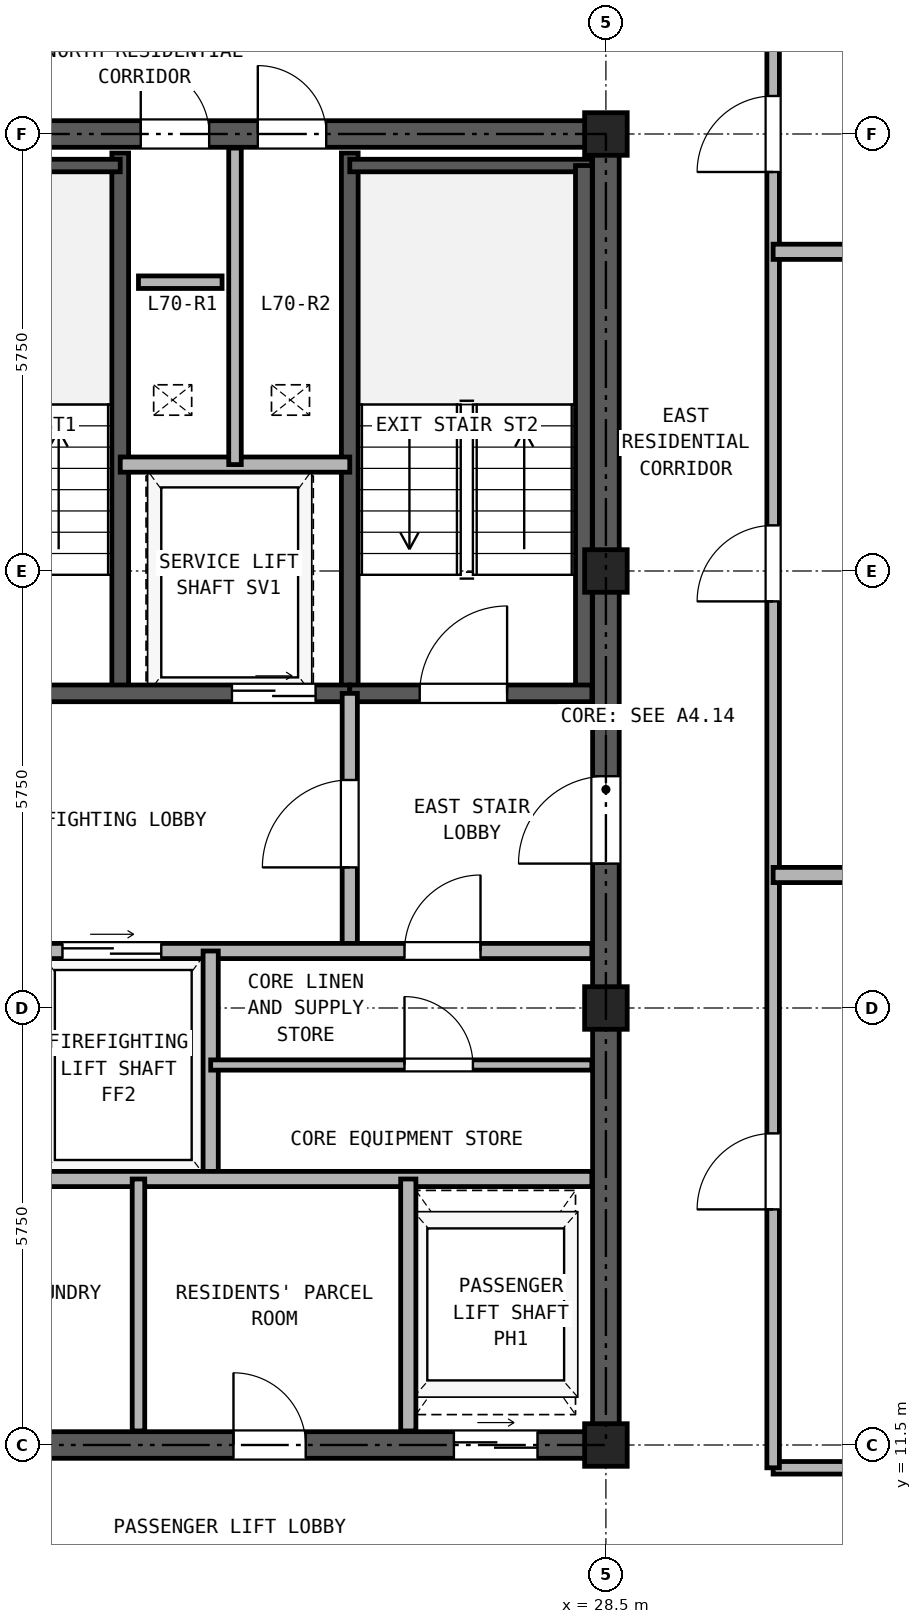
"""IFC4 building model, lengths in metres.
Left out: names, types, materials, properties, quantities, classifications, styles, units other than length and angle.
Written with IfcOpenShell. Run it as: python <this file> out.ifc"""

import sys

from ifc_helpers import new_model, si_unit, direction, frame, frame_2d, origin, origin_2d, place, context, subcontext, project, spatial, rectangle, hollow_rectangle, extrude, source, transform, mapped, element, fill, save


model = new_model("IFC4")
c1 = context("Model", 3, precision=1e-05, world=origin(), true_north=direction((0.0, 1.0)))
c2 = subcontext(c1, "Body", "Model", "MODEL_VIEW")
j1 = project(units=[si_unit("LENGTHUNIT", "METRE"), si_unit("PLANEANGLEUNIT", "RADIAN")], contexts=[c1])
p1 = place(None, origin())
s1 = spatial("IfcSite", under=j1, at=p1, CompositionType="ELEMENT")
p2 = place(p1, origin())
s2 = spatial("IfcBuilding", under=s1, at=p2, CompositionType="ELEMENT")
p3 = place(p2, frame((0.0, 0.0, 245.7)))
s3 = spatial("IfcBuildingStorey", under=s2, at=p3, CompositionType="ELEMENT", Elevation=245.7)
m1 = source(origin(), c2, "Body", "SweptSolid", [
    extrude(hollow_rectangle(XDim=0.56, YDim=0.56, WallThickness=0.03, at=origin_2d()), origin(), (0.0, 0.0, 1.0), 2.98),
])
for number, where, z_axis, x_axis in (
    (1, (28.5, 11.5, 0.0), (0.0, 0.0, 1.0), (1.0, 0.0, 0.0)),
    (2, (28.5, 17.25, 0.0), (0.0, 0.0, 1.0), (1.0, 0.0, 0.0)),
    (3, (28.5, 23.0, 0.0), (0.0, 0.0, 1.0), (1.0, 0.0, 0.0)),
    (4, (28.5, 28.75, 0.0), (0.0, 0.0, 1.0), (1.0, 0.0, 0.0)),
):
    element("IfcColumn", number, at=place(p3, frame(where, z_axis=z_axis, x_axis=x_axis)), inside=s3, PredefinedType="COLUMN", context=c2, shape_type="MappedRepresentation", body=[
        mapped(m1, transform((0.0, 0.0, 0.0), x_axis=(1.0, 0.0, 0.0), y_axis=(0.0, 1.0, 0.0), z_axis=(0.0, 0.0, 1.0), scale=1.0)),
    ])
p4 = place(p3, frame((18.325, 11.5, 0.0), z_axis=(0.0, 0.0, 1.0), x_axis=(1.0, 0.0, 0.0)))
e5 = element("IfcWall", 5, at=p4, inside=s3, PredefinedType="SHEAR", context=c2, shape_type="SweptSolid", body=[
    extrude(rectangle(XDim=10.35, YDim=0.35, at=frame_2d((5.175, 0.0))), origin(), (0.0, 0.0, 1.0), 2.98),
])
p5 = place(p4, frame((1.775, 0.0, 0.0)))
e6 = element("IfcOpeningElement", 6, at=p5, cuts=e5, PredefinedType="OPENING", context=c2, shape_type="SweptSolid", body=[
    extrude(rectangle(XDim=0.95, YDim=2.15, at=frame_2d((0.475, 1.075))), frame((0.0, 0.185, 0.0), z_axis=(0.0, -1.0, 0.0), x_axis=(1.0, 0.0, 0.0)), (0.0, 0.0, 1.0), 0.37),
])
p6 = place(p4, frame((5.275, 0.0, 0.0)))
e7 = element("IfcOpeningElement", 7, at=p6, cuts=e5, PredefinedType="OPENING", context=c2, shape_type="SweptSolid", body=[
    extrude(rectangle(XDim=0.95, YDim=2.15, at=frame_2d((0.475, 1.075))), frame((0.0, 0.185, 0.0), z_axis=(0.0, -1.0, 0.0), x_axis=(1.0, 0.0, 0.0)), (0.0, 0.0, 1.0), 0.37),
])
p7 = place(p4, frame((8.175, 0.0, 0.0)))
e8 = element("IfcOpeningElement", 8, at=p7, cuts=e5, PredefinedType="OPENING", context=c2, shape_type="SweptSolid", body=[
    extrude(rectangle(XDim=1.1, YDim=2.25, at=frame_2d((0.55, 1.125))), frame((0.0, 0.185, 0.0), z_axis=(0.0, -1.0, 0.0), x_axis=(1.0, 0.0, 0.0)), (0.0, 0.0, 1.0), 0.37),
])
p8 = place(p3, frame((18.325, 28.75, 0.0), z_axis=(0.0, 0.0, 1.0), x_axis=(1.0, 0.0, 0.0)))
e9 = element("IfcWall", 9, at=p8, inside=s3, PredefinedType="SHEAR", context=c2, shape_type="SweptSolid", body=[
    extrude(rectangle(XDim=10.35, YDim=0.35, at=frame_2d((5.175, 0.0))), origin(), (0.0, 0.0, 1.0), 2.98),
])
p9 = place(p8, frame((4.055, 0.0, 0.0)))
e10 = element("IfcOpeningElement", 10, at=p9, cuts=e9, PredefinedType="OPENING", context=c2, shape_type="SweptSolid", body=[
    extrude(rectangle(XDim=0.9, YDim=2.05, at=frame_2d((0.45, 1.025))), frame((0.0, 0.185, 0.0), z_axis=(0.0, -1.0, 0.0), x_axis=(1.0, 0.0, 0.0)), (0.0, 0.0, 1.0), 0.37),
])
p10 = place(p8, frame((5.595, 0.0, 0.0)))
e11 = element("IfcOpeningElement", 11, at=p10, cuts=e9, PredefinedType="OPENING", context=c2, shape_type="SweptSolid", body=[
    extrude(rectangle(XDim=0.9, YDim=2.05, at=frame_2d((0.45, 1.025))), frame((0.0, 0.185, 0.0), z_axis=(0.0, -1.0, 0.0), x_axis=(1.0, 0.0, 0.0)), (0.0, 0.0, 1.0), 0.37),
])
p11 = place(p3, frame((28.5, 11.675, 0.0), z_axis=(0.0, 0.0, 1.0), x_axis=(0.0, 1.0, 0.0)))
e12 = element("IfcWall", 12, at=p11, inside=s3, PredefinedType="SHEAR", context=c2, shape_type="SweptSolid", body=[
    extrude(rectangle(XDim=16.9, YDim=0.35, at=frame_2d((8.45, 0.0))), origin(), (0.0, 0.0, 1.0), 2.98),
])
p12 = place(p11, frame((7.475, 0.0, 0.0)))
e13 = element("IfcOpeningElement", 13, at=p12, cuts=e12, PredefinedType="OPENING", context=c2, shape_type="SweptSolid", body=[
    extrude(rectangle(XDim=1.15, YDim=2.2, at=frame_2d((0.575, 1.1))), frame((0.0, 0.185, 0.0), z_axis=(0.0, -1.0, 0.0), x_axis=(1.0, 0.0, 0.0)), (0.0, 0.0, 1.0), 0.37),
])
for number, where, z_axis, x_axis in (
    (14, (22.11, 21.39, 0.0), (0.0, 0.0, 1.0), (0.0, 1.0, 0.0)),
    (15, (25.13, 21.39, 0.0), (0.0, 0.0, 1.0), (0.0, 1.0, 0.0)),
):
    element("IfcWall", number, at=place(p3, frame(where, z_axis=z_axis, x_axis=x_axis)), inside=s3, PredefinedType="SOLIDWALL", context=c2, shape_type="SweptSolid", body=[
        extrude(rectangle(XDim=7.11, YDim=0.22, at=frame_2d((3.555, 0.0))), origin(), (0.0, 0.0, 1.0), 2.98),
    ])
p13 = place(p3, frame((18.685, 28.335, 0.0), z_axis=(0.0, 0.0, 1.0), x_axis=(1.0, 0.0, 0.0)))
e16 = element("IfcWall", 16, at=p13, inside=s3, PredefinedType="PARTITIONING", context=c2, shape_type="SweptSolid", body=[
    extrude(rectangle(XDim=3.425, YDim=0.165, at=frame_2d((1.712, 0.0))), origin(), (0.0, 0.0, 1.0), 2.98),
])
p14 = place(p3, frame((25.13, 28.335, 0.0), z_axis=(0.0, 0.0, 1.0), x_axis=(1.0, 0.0, 0.0)))
e17 = element("IfcWall", 17, at=p14, inside=s3, PredefinedType="PARTITIONING", context=c2, shape_type="SweptSolid", body=[
    extrude(rectangle(XDim=3.185, YDim=0.165, at=frame_2d((1.593, 0.0))), origin(), (0.0, 0.0, 1.0), 2.98),
])
p15 = place(p3, frame((28.21, 21.39, 0.0), z_axis=(0.0, 0.0, 1.0), x_axis=(0.0, 1.0, 0.0)))
e18 = element("IfcWall", 18, at=p15, inside=s3, PredefinedType="SOLIDWALL", context=c2, shape_type="SweptSolid", body=[
    extrude(rectangle(XDim=6.945, YDim=0.22, at=frame_2d((3.473, 0.0))), origin(), (0.0, 0.0, 1.0), 2.98),
])
p16 = place(p3, frame((18.685, 21.39, 0.0), z_axis=(0.0, 0.0, 1.0), x_axis=(1.0, 0.0, 0.0)))
e19 = element("IfcWall", 19, at=p16, inside=s3, PredefinedType="SOLIDWALL", context=c2, shape_type="SweptSolid", body=[
    extrude(rectangle(XDim=6.445, YDim=0.22, at=frame_2d((3.222, 0.0))), origin(), (0.0, 0.0, 1.0), 2.98),
])
p17 = place(p16, frame((1.165, 0.0, 0.0)))
e20 = element("IfcOpeningElement", 20, at=p17, cuts=e19, PredefinedType="OPENING", context=c2, shape_type="SweptSolid", body=[
    extrude(rectangle(XDim=1.15, YDim=2.2, at=frame_2d((0.575, 1.1))), frame((0.0, 0.12, 0.0), z_axis=(0.0, -1.0, 0.0), x_axis=(1.0, 0.0, 0.0)), (0.0, 0.0, 1.0), 0.24),
])
p18 = place(p16, frame((4.895, 0.0, 0.0)))
e21 = element("IfcOpeningElement", 21, at=p18, cuts=e19, PredefinedType="OPENING", context=c2, shape_type="SweptSolid", body=[
    extrude(rectangle(XDim=1.1, YDim=2.25, at=frame_2d((0.55, 1.125))), frame((0.0, 0.12, 0.0), z_axis=(0.0, -1.0, 0.0), x_axis=(1.0, 0.0, 0.0)), (0.0, 0.0, 1.0), 0.24),
])
p19 = place(p3, frame((25.13, 21.39, 0.0), z_axis=(0.0, 0.0, 1.0), x_axis=(1.0, 0.0, 0.0)))
e22 = element("IfcWall", 22, at=p19, inside=s3, PredefinedType="SOLIDWALL", context=c2, shape_type="SweptSolid", body=[
    extrude(rectangle(XDim=3.185, YDim=0.22, at=frame_2d((1.593, 0.0))), origin(), (0.0, 0.0, 1.0), 2.98),
])
p20 = place(p19, frame((0.92, 0.0, 0.0)))
e23 = element("IfcOpeningElement", 23, at=p20, cuts=e22, PredefinedType="OPENING", context=c2, shape_type="SweptSolid", body=[
    extrude(rectangle(XDim=1.15, YDim=2.2, at=frame_2d((0.575, 1.1))), frame((0.0, 0.12, 0.0), z_axis=(0.0, -1.0, 0.0), x_axis=(1.0, 0.0, 0.0)), (0.0, 0.0, 1.0), 0.24),
])
p21 = place(p3, frame((22.11, 24.4, 0.0), z_axis=(0.0, 0.0, 1.0), x_axis=(1.0, 0.0, 0.0)))
e24 = element("IfcWall", 24, at=p21, inside=s3, PredefinedType="PARTITIONING", context=c2, shape_type="SweptSolid", body=[
    extrude(rectangle(XDim=3.02, YDim=0.2, at=frame_2d((1.51, 0.0))), origin(), (0.0, 0.0, 1.0), 2.98),
])
p22 = place(p3, frame((23.62, 24.4, 0.0), z_axis=(0.0, 0.0, 1.0), x_axis=(0.0, 1.0, 0.0)))
e25 = element("IfcWall", 25, at=p22, inside=s3, PredefinedType="PARTITIONING", context=c2, shape_type="SweptSolid", body=[
    extrude(rectangle(XDim=4.165, YDim=0.165, at=frame_2d((2.083, 0.0))), origin(), (0.0, 0.0, 1.0), 2.98),
])
p23 = place(p3, frame((25.13, 18.0, 0.0), z_axis=(0.0, 0.0, 1.0), x_axis=(0.0, 1.0, 0.0)))
e26 = element("IfcWall", 26, at=p23, inside=s3, PredefinedType="PARTITIONING", context=c2, shape_type="SweptSolid", body=[
    extrude(rectangle(XDim=3.39, YDim=0.2, at=frame_2d((1.695, 0.0))), origin(), (0.0, 0.0, 1.0), 2.98),
])
p24 = place(p23, frame((1.1, 0.0, 0.0)))
e27 = element("IfcOpeningElement", 27, at=p24, cuts=e26, PredefinedType="OPENING", context=c2, shape_type="SweptSolid", body=[
    extrude(rectangle(XDim=1.15, YDim=2.2, at=frame_2d((0.575, 1.1))), frame((0.0, 0.11, 0.0), z_axis=(0.0, -1.0, 0.0), x_axis=(1.0, 0.0, 0.0)), (0.0, 0.0, 1.0), 0.22),
])
p25 = place(p3, frame((18.685, 18.0, 0.0), z_axis=(0.0, 0.0, 1.0), x_axis=(1.0, 0.0, 0.0)))
e28 = element("IfcWall", 28, at=p25, inside=s3, PredefinedType="PARTITIONING", context=c2, shape_type="SweptSolid", body=[
    extrude(rectangle(XDim=9.63, YDim=0.2, at=frame_2d((4.815, 0.0))), origin(), (0.0, 0.0, 1.0), 2.98),
])
p26 = place(p25, frame((0.565, 0.0, 0.0)))
e29 = element("IfcOpeningElement", 29, at=p26, cuts=e28, PredefinedType="OPENING", context=c2, shape_type="SweptSolid", body=[
    extrude(rectangle(XDim=1.3, YDim=2.3, at=frame_2d((0.65, 1.15))), frame((0.0, 0.11, 0.0), z_axis=(0.0, -1.0, 0.0), x_axis=(1.0, 0.0, 0.0)), (0.0, 0.0, 1.0), 0.22),
])
p27 = place(p25, frame((2.665, 0.0, 0.0)))
e30 = element("IfcOpeningElement", 30, at=p27, cuts=e28, PredefinedType="OPENING", context=c2, shape_type="SweptSolid", body=[
    extrude(rectangle(XDim=1.3, YDim=2.3, at=frame_2d((0.65, 1.15))), frame((0.0, 0.11, 0.0), z_axis=(0.0, -1.0, 0.0), x_axis=(1.0, 0.0, 0.0)), (0.0, 0.0, 1.0), 0.22),
])
p28 = place(p25, frame((7.165, 0.0, 0.0)))
e31 = element("IfcOpeningElement", 31, at=p28, cuts=e28, PredefinedType="OPENING", context=c2, shape_type="SweptSolid", body=[
    extrude(rectangle(XDim=1.0, YDim=2.15, at=frame_2d((0.5, 1.075))), frame((0.0, 0.11, 0.0), z_axis=(0.0, -1.0, 0.0), x_axis=(1.0, 0.0, 0.0)), (0.0, 0.0, 1.0), 0.22),
])
p29 = place(p3, frame((23.3, 15.0, 0.0), z_axis=(0.0, 0.0, 1.0), x_axis=(0.0, 1.0, 0.0)))
e32 = element("IfcWall", 32, at=p29, inside=s3, PredefinedType="PARTITIONING", context=c2, shape_type="SweptSolid", body=[
    extrude(rectangle(XDim=3.0, YDim=0.2, at=frame_2d((1.5, 0.0))), origin(), (0.0, 0.0, 1.0), 2.98),
])
p30 = place(p3, frame((18.685, 15.0, 0.0), z_axis=(0.0, 0.0, 1.0), x_axis=(1.0, 0.0, 0.0)))
e33 = element("IfcWall", 33, at=p30, inside=s3, PredefinedType="PARTITIONING", context=c2, shape_type="SweptSolid", body=[
    extrude(rectangle(XDim=9.63, YDim=0.2, at=frame_2d((4.815, 0.0))), origin(), (0.0, 0.0, 1.0), 2.98),
])
p31 = place(p3, frame((23.3, 16.5, 0.0), z_axis=(0.0, 0.0, 1.0), x_axis=(1.0, 0.0, 0.0)))
e34 = element("IfcWall", 34, at=p31, inside=s3, PredefinedType="PARTITIONING", context=c2, shape_type="SweptSolid", body=[
    extrude(rectangle(XDim=5.015, YDim=0.135, at=frame_2d((2.507, 0.0))), origin(), (0.0, 0.0, 1.0), 2.98),
])
p32 = place(p31, frame((2.55, 0.0, 0.0)))
e35 = element("IfcOpeningElement", 35, at=p32, cuts=e34, PredefinedType="OPENING", context=c2, shape_type="SweptSolid", body=[
    extrude(rectangle(XDim=0.9, YDim=2.05, at=frame_2d((0.45, 1.025))), frame((0.0, 0.077, 0.0), z_axis=(0.0, -1.0, 0.0), x_axis=(1.0, 0.0, 0.0)), (0.0, 0.0, 1.0), 0.155),
])
p33 = place(p3, frame((22.35, 11.685, 0.0), z_axis=(0.0, 0.0, 1.0), x_axis=(0.0, 1.0, 0.0)))
e36 = element("IfcWall", 36, at=p33, inside=s3, PredefinedType="PARTITIONING", context=c2, shape_type="SweptSolid", body=[
    extrude(rectangle(XDim=3.315, YDim=0.165, at=frame_2d((1.657, 0.0))), origin(), (0.0, 0.0, 1.0), 2.98),
])
p34 = place(p3, frame((25.9, 11.685, 0.0), z_axis=(0.0, 0.0, 1.0), x_axis=(0.0, 1.0, 0.0)))
e37 = element("IfcWall", 37, at=p34, inside=s3, PredefinedType="PARTITIONING", context=c2, shape_type="SweptSolid", body=[
    extrude(rectangle(XDim=3.315, YDim=0.2, at=frame_2d((1.657, 0.0))), origin(), (0.0, 0.0, 1.0), 2.98),
])
p35 = place(p3, frame((30.7, 11.2, 0.0), z_axis=(0.0, 0.0, 1.0), x_axis=(1.0, 0.0, 0.0)))
e38 = element("IfcWall", 38, at=p35, inside=s3, PredefinedType="PARTITIONING", context=c2, shape_type="SweptSolid", body=[
    extrude(rectangle(XDim=7.5, YDim=0.165, at=frame_2d((3.75, 0.0))), origin(), (0.0, 0.0, 1.0), 2.98),
])
p36 = place(p3, frame((30.7, 11.2, 0.0), z_axis=(0.0, 0.0, 1.0), x_axis=(0.0, 1.0, 0.0)))
e39 = element("IfcWall", 39, at=p36, inside=s3, PredefinedType="PARTITIONING", context=c2, shape_type="SweptSolid", body=[
    extrude(rectangle(XDim=23.94, YDim=0.165, at=frame_2d((11.97, 0.0))), origin(), (0.0, 0.0, 1.0), 2.98),
])
p37 = place(p36, frame((3.4, 0.0, 0.0)))
e40 = element("IfcOpeningElement", 40, at=p37, cuts=e39, PredefinedType="OPENING", context=c2, shape_type="SweptSolid", body=[
    extrude(rectangle(XDim=1.0, YDim=2.15, at=frame_2d((0.5, 1.075))), frame((0.0, 0.093, 0.0), z_axis=(0.0, -1.0, 0.0), x_axis=(1.0, 0.0, 0.0)), (0.0, 0.0, 1.0), 0.185),
])
p38 = place(p36, frame((11.4, 0.0, 0.0)))
e41 = element("IfcOpeningElement", 41, at=p38, cuts=e39, PredefinedType="OPENING", context=c2, shape_type="SweptSolid", body=[
    extrude(rectangle(XDim=1.0, YDim=2.15, at=frame_2d((0.5, 1.075))), frame((0.0, 0.093, 0.0), z_axis=(0.0, -1.0, 0.0), x_axis=(1.0, 0.0, 0.0)), (0.0, 0.0, 1.0), 0.185),
])
p39 = place(p36, frame((17.05, 0.0, 0.0)))
e42 = element("IfcOpeningElement", 42, at=p39, cuts=e39, PredefinedType="OPENING", context=c2, shape_type="SweptSolid", body=[
    extrude(rectangle(XDim=1.0, YDim=2.15, at=frame_2d((0.5, 1.075))), frame((0.0, 0.093, 0.0), z_axis=(0.0, -1.0, 0.0), x_axis=(1.0, 0.0, 0.0)), (0.0, 0.0, 1.0), 0.185),
])
for number, where, z_axis, x_axis in (
    (43, (30.7, 19.0, 0.0), (0.0, 0.0, 1.0), (1.0, 0.0, 0.0)),
    (44, (30.7, 27.2, 0.0), (0.0, 0.0, 1.0), (1.0, 0.0, 0.0)),
):
    element("IfcWall", number, at=place(p3, frame(where, z_axis=z_axis, x_axis=x_axis)), inside=s3, PredefinedType="PARTITIONING", context=c2, shape_type="SweptSolid", body=[
        extrude(rectangle(XDim=10.94, YDim=0.2, at=frame_2d((5.47, 0.0))), origin(), (0.0, 0.0, 1.0), 2.98),
    ])
p40 = place(p3, frame((22.35, 26.8, 0.0), z_axis=(0.0, 0.0, 1.0), x_axis=(1.0, 0.0, 0.0)))
e45 = element("IfcWall", 45, at=p40, inside=s3, PredefinedType="PARTITIONING", context=c2, shape_type="SweptSolid", body=[
    extrude(rectangle(XDim=1.1, YDim=0.165, at=frame_2d((0.55, 0.0))), origin(), (0.0, 0.0, 1.0), 2.98),
])
p41 = place(p20, frame((1.15, 0.0, 0.0), z_axis=(0.0, 0.0, 1.0), x_axis=(-1.0, 0.0, 0.0)))
e46 = element("IfcDoor", 46, at=p41, inside=s3, OperationType="SINGLE_SWING_RIGHT", PredefinedType="DOOR", context=c2, shape_type="SweptSolid", body=[
    extrude(rectangle(XDim=1.15, YDim=2.2, at=frame_2d((0.575, 1.1))), frame((0.0, 0.025, 0.0), z_axis=(0.0, -1.0, 0.0), x_axis=(1.0, 0.0, 0.0)), (0.0, 0.0, 1.0), 0.05),
])
fill(e23, e46)
p42 = place(p18, frame((1.1, 0.0, 0.0), z_axis=(0.0, 0.0, 1.0), x_axis=(-1.0, 0.0, 0.0)))
e47 = element("IfcDoor", 47, at=p42, inside=s3, OperationType="DOUBLE_DOOR_SLIDING", PredefinedType="DOOR", context=c2, shape_type="SweptSolid", body=[
    extrude(rectangle(XDim=1.1, YDim=2.25, at=frame_2d((0.55, 1.125))), frame((0.0, 0.025, 0.0), z_axis=(0.0, -1.0, 0.0), x_axis=(1.0, 0.0, 0.0)), (0.0, 0.0, 1.0), 0.05),
])
fill(e21, e47)
p43 = place(p24, origin())
e48 = element("IfcDoor", 48, at=p43, inside=s3, OperationType="SINGLE_SWING_LEFT", PredefinedType="DOOR", context=c2, shape_type="SweptSolid", body=[
    extrude(rectangle(XDim=1.15, YDim=2.2, at=frame_2d((0.575, 1.1))), frame((0.0, 0.025, 0.0), z_axis=(0.0, -1.0, 0.0), x_axis=(1.0, 0.0, 0.0)), (0.0, 0.0, 1.0), 0.05),
])
fill(e27, e48)
p44 = place(p27, origin())
e49 = element("IfcDoor", 49, at=p44, inside=s3, OperationType="DOUBLE_DOOR_SLIDING", PredefinedType="DOOR", context=c2, shape_type="SweptSolid", body=[
    extrude(rectangle(XDim=1.3, YDim=2.3, at=frame_2d((0.65, 1.15))), frame((0.0, 0.025, 0.0), z_axis=(0.0, -1.0, 0.0), x_axis=(1.0, 0.0, 0.0)), (0.0, 0.0, 1.0), 0.05),
])
fill(e30, e49)
p45 = place(p28, frame((1.0, 0.0, 0.0), z_axis=(0.0, 0.0, 1.0), x_axis=(-1.0, 0.0, 0.0)))
e50 = element("IfcDoor", 50, at=p45, inside=s3, OperationType="SINGLE_SWING_RIGHT", PredefinedType="DOOR", context=c2, shape_type="SweptSolid", body=[
    extrude(rectangle(XDim=1.0, YDim=2.15, at=frame_2d((0.5, 1.075))), frame((0.0, 0.025, 0.0), z_axis=(0.0, -1.0, 0.0), x_axis=(1.0, 0.0, 0.0)), (0.0, 0.0, 1.0), 0.05),
])
fill(e31, e50)
p46 = place(p32, frame((0.9, 0.0, 0.0), z_axis=(0.0, 0.0, 1.0), x_axis=(-1.0, 0.0, 0.0)))
e51 = element("IfcDoor", 51, at=p46, inside=s3, OperationType="SINGLE_SWING_LEFT", PredefinedType="DOOR", context=c2, shape_type="SweptSolid", body=[
    extrude(rectangle(XDim=0.9, YDim=2.05, at=frame_2d((0.45, 1.025))), frame((0.0, 0.025, 0.0), z_axis=(0.0, -1.0, 0.0), x_axis=(1.0, 0.0, 0.0)), (0.0, 0.0, 1.0), 0.05),
])
fill(e35, e51)
p47 = place(p12, origin())
e52 = element("IfcDoor", 52, at=p47, inside=s3, OperationType="SINGLE_SWING_LEFT", PredefinedType="DOOR", context=c2, shape_type="SweptSolid", body=[
    extrude(rectangle(XDim=1.15, YDim=2.2, at=frame_2d((0.575, 1.1))), frame((0.0, 0.025, 0.0), z_axis=(0.0, -1.0, 0.0), x_axis=(1.0, 0.0, 0.0)), (0.0, 0.0, 1.0), 0.05),
])
fill(e13, e52)
p48 = place(p9, origin())
e53 = element("IfcDoor", 53, at=p48, inside=s3, OperationType="SINGLE_SWING_LEFT", PredefinedType="DOOR", context=c2, shape_type="SweptSolid", body=[
    extrude(rectangle(XDim=0.9, YDim=2.05, at=frame_2d((0.45, 1.025))), frame((0.0, 0.025, 0.0), z_axis=(0.0, -1.0, 0.0), x_axis=(1.0, 0.0, 0.0)), (0.0, 0.0, 1.0), 0.05),
])
fill(e10, e53)
p49 = place(p10, origin())
e54 = element("IfcDoor", 54, at=p49, inside=s3, OperationType="SINGLE_SWING_LEFT", PredefinedType="DOOR", context=c2, shape_type="SweptSolid", body=[
    extrude(rectangle(XDim=0.9, YDim=2.05, at=frame_2d((0.45, 1.025))), frame((0.0, 0.025, 0.0), z_axis=(0.0, -1.0, 0.0), x_axis=(1.0, 0.0, 0.0)), (0.0, 0.0, 1.0), 0.05),
])
fill(e11, e54)
p50 = place(p6, frame((0.95, 0.0, 0.0), z_axis=(0.0, 0.0, 1.0), x_axis=(-1.0, 0.0, 0.0)))
e55 = element("IfcDoor", 55, at=p50, inside=s3, OperationType="SINGLE_SWING_LEFT", PredefinedType="DOOR", context=c2, shape_type="SweptSolid", body=[
    extrude(rectangle(XDim=0.95, YDim=2.15, at=frame_2d((0.475, 1.075))), frame((0.0, 0.025, 0.0), z_axis=(0.0, -1.0, 0.0), x_axis=(1.0, 0.0, 0.0)), (0.0, 0.0, 1.0), 0.05),
])
fill(e7, e55)
p51 = place(p7, frame((1.1, 0.0, 0.0), z_axis=(0.0, 0.0, 1.0), x_axis=(-1.0, 0.0, 0.0)))
e56 = element("IfcDoor", 56, at=p51, inside=s3, OperationType="DOUBLE_DOOR_SLIDING", PredefinedType="DOOR", context=c2, shape_type="SweptSolid", body=[
    extrude(rectangle(XDim=1.1, YDim=2.25, at=frame_2d((0.55, 1.125))), frame((0.0, 0.025, 0.0), z_axis=(0.0, -1.0, 0.0), x_axis=(1.0, 0.0, 0.0)), (0.0, 0.0, 1.0), 0.05),
])
fill(e8, e56)
p52 = place(p37, frame((1.0, 0.0, 0.0), z_axis=(0.0, 0.0, 1.0), x_axis=(-1.0, 0.0, 0.0)))
e57 = element("IfcDoor", 57, at=p52, inside=s3, OperationType="SINGLE_SWING_LEFT", PredefinedType="DOOR", context=c2, shape_type="SweptSolid", body=[
    extrude(rectangle(XDim=1.0, YDim=2.15, at=frame_2d((0.5, 1.075))), frame((0.0, 0.025, 0.0), z_axis=(0.0, -1.0, 0.0), x_axis=(1.0, 0.0, 0.0)), (0.0, 0.0, 1.0), 0.05),
])
fill(e40, e57)
p53 = place(p38, frame((1.0, 0.0, 0.0), z_axis=(0.0, 0.0, 1.0), x_axis=(-1.0, 0.0, 0.0)))
e58 = element("IfcDoor", 58, at=p53, inside=s3, OperationType="SINGLE_SWING_LEFT", PredefinedType="DOOR", context=c2, shape_type="SweptSolid", body=[
    extrude(rectangle(XDim=1.0, YDim=2.15, at=frame_2d((0.5, 1.075))), frame((0.0, 0.025, 0.0), z_axis=(0.0, -1.0, 0.0), x_axis=(1.0, 0.0, 0.0)), (0.0, 0.0, 1.0), 0.05),
])
fill(e41, e58)
p54 = place(p39, frame((1.0, 0.0, 0.0), z_axis=(0.0, 0.0, 1.0), x_axis=(-1.0, 0.0, 0.0)))
e59 = element("IfcDoor", 59, at=p54, inside=s3, OperationType="SINGLE_SWING_LEFT", PredefinedType="DOOR", context=c2, shape_type="SweptSolid", body=[
    extrude(rectangle(XDim=1.0, YDim=2.15, at=frame_2d((0.5, 1.075))), frame((0.0, 0.025, 0.0), z_axis=(0.0, -1.0, 0.0), x_axis=(1.0, 0.0, 0.0)), (0.0, 0.0, 1.0), 0.05),
])
fill(e42, e59)
save(model, sys.argv[1])
